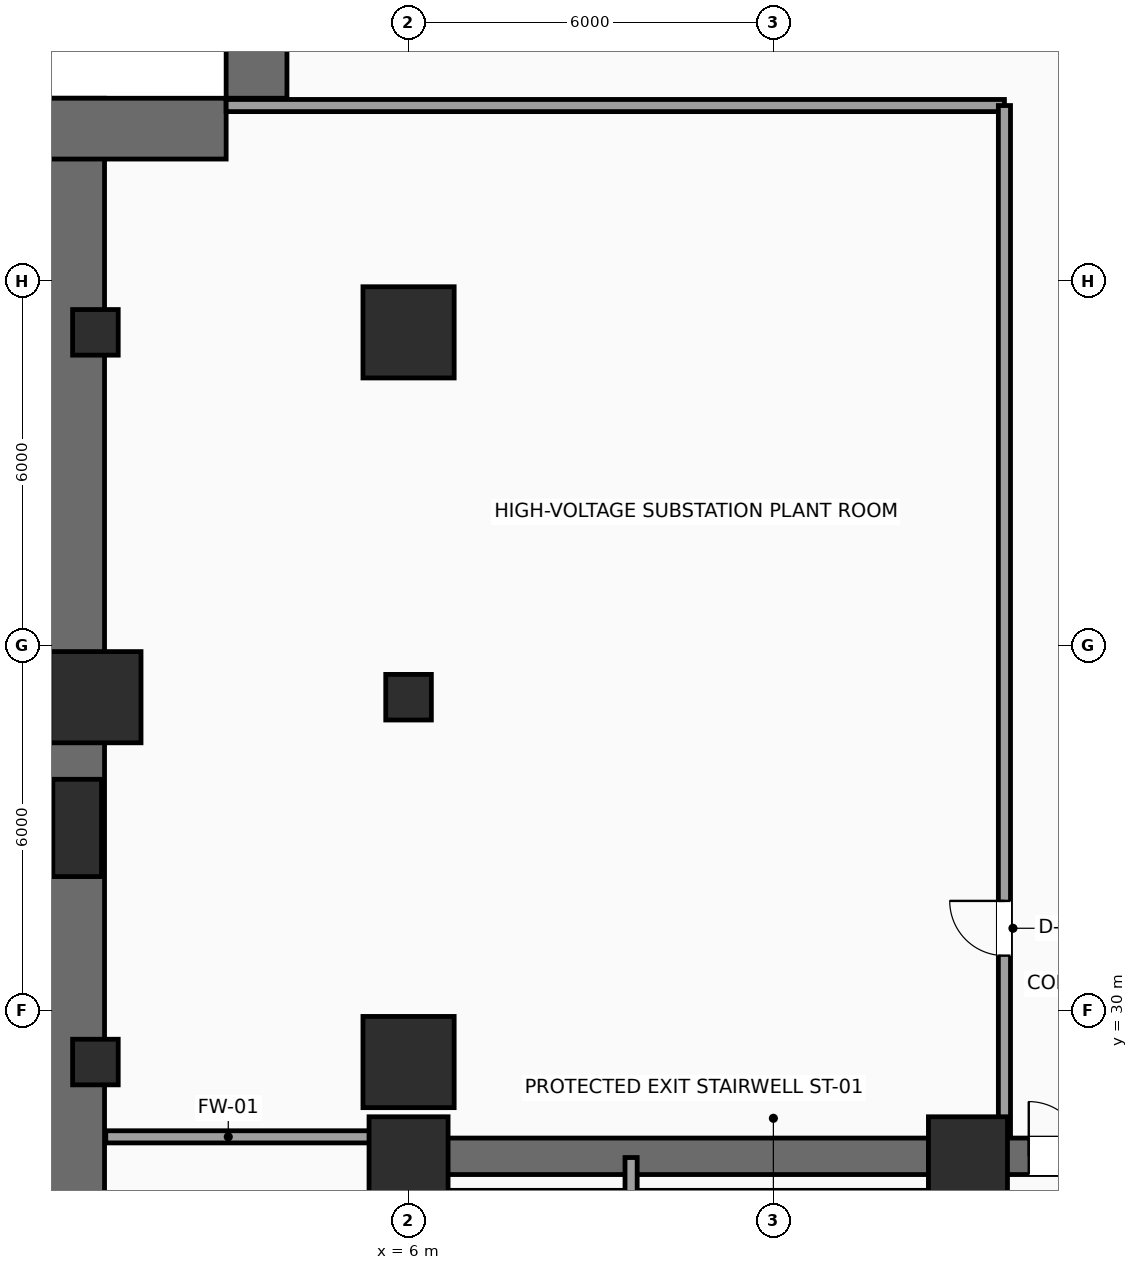
"""IFC4 building model, lengths in metres.
Left out: names, types, materials, properties, quantities, classifications, styles, units other than length and angle.
Written with IfcOpenShell. Run it as: python <this file> out.ifc"""

import sys

from ifc_helpers import new_model, si_unit, direction, frame, frame_2d, origin, origin_2d, place, context, subcontext, project, spatial, rectangle, hollow_rectangle, extrude, element, fill, save


model = new_model("IFC4")
c1 = context("Model", 3, precision=1e-05, world=origin(), true_north=direction((0.0, 1.0)))
c2 = subcontext(c1, "Body", "Model", "MODEL_VIEW")
j1 = project(units=[si_unit("LENGTHUNIT", "METRE"), si_unit("PLANEANGLEUNIT", "RADIAN")], contexts=[c1])
p1 = place(None, origin())
s1 = spatial("IfcSite", under=j1, at=p1, CompositionType="ELEMENT")
p2 = place(p1, origin())
s2 = spatial("IfcBuilding", under=s1, at=p2, CompositionType="ELEMENT")
p3 = place(p2, frame((0.0, 0.0, -9.6)))
s3 = spatial("IfcBuildingStorey", under=s2, at=p3, CompositionType="ELEMENT", Elevation=-9.6)
for number, where, z_axis, x_axis in (
    (1, (6.0, 27.6, 0.0), (0.0, 0.0, 1.0), (1.0, 0.0, 0.0)),
    (2, (15.2, 27.6, 0.0), (0.0, 0.0, 1.0), (1.0, 0.0, 0.0)),
):
    element("IfcColumn", number, at=place(p3, frame(where, z_axis=z_axis, x_axis=x_axis)), inside=s3, PredefinedType="COLUMN", context=c2, shape_type="SweptSolid", body=[
        extrude(rectangle(XDim=1.3, YDim=1.3, at=origin_2d()), origin(), (0.0, 0.0, 1.0), 4.8),
    ])
p4 = place(p3, frame((0.85, 29.15, 0.0), z_axis=(0.0, 0.0, 1.0), x_axis=(1.0, 0.0, 0.0)))
e3 = element("IfcColumn", 3, at=p4, inside=s3, PredefinedType="COLUMN", context=c2, shape_type="SweptSolid", body=[
    extrude(hollow_rectangle(XDim=0.75, YDim=0.75, WallThickness=0.035, InnerFilletRadius=0.035, OuterFilletRadius=0.05, at=origin_2d()), origin(), (0.0, 0.0, 1.0), 4.8),
])
p5 = place(p3, frame((0.85, 35.15, 0.0), z_axis=(0.0, 0.0, 1.0), x_axis=(1.0, 0.0, 0.0)))
e4 = element("IfcColumn", 4, at=p5, inside=s3, PredefinedType="COLUMN", context=c2, shape_type="SweptSolid", body=[
    extrude(rectangle(XDim=1.5, YDim=1.5, at=origin_2d()), origin(), (0.0, 0.0, 1.0), 4.8),
])
p6 = place(p3, frame((0.85, 41.15, 0.0), z_axis=(0.0, 0.0, 1.0), x_axis=(1.0, 0.0, 0.0)))
e5 = element("IfcColumn", 5, at=p6, inside=s3, PredefinedType="COLUMN", context=c2, shape_type="SweptSolid", body=[
    extrude(hollow_rectangle(XDim=0.75, YDim=0.75, WallThickness=0.035, InnerFilletRadius=0.035, OuterFilletRadius=0.05, at=origin_2d()), origin(), (0.0, 0.0, 1.0), 4.8),
])
p7 = place(p3, frame((6.0, 29.15, 0.0), z_axis=(0.0, 0.0, 1.0), x_axis=(1.0, 0.0, 0.0)))
e6 = element("IfcColumn", 6, at=p7, inside=s3, PredefinedType="COLUMN", context=c2, shape_type="SweptSolid", body=[
    extrude(rectangle(XDim=1.5, YDim=1.5, at=origin_2d()), origin(), (0.0, 0.0, 1.0), 4.8),
])
p8 = place(p3, frame((6.0, 35.15, 0.0), z_axis=(0.0, 0.0, 1.0), x_axis=(1.0, 0.0, 0.0)))
e7 = element("IfcColumn", 7, at=p8, inside=s3, PredefinedType="COLUMN", context=c2, shape_type="SweptSolid", body=[
    extrude(hollow_rectangle(XDim=0.75, YDim=0.75, WallThickness=0.035, InnerFilletRadius=0.035, OuterFilletRadius=0.05, at=origin_2d()), origin(), (0.0, 0.0, 1.0), 4.8),
])
p9 = place(p3, frame((6.0, 41.15, 0.0), z_axis=(0.0, 0.0, 1.0), x_axis=(1.0, 0.0, 0.0)))
e8 = element("IfcColumn", 8, at=p9, inside=s3, PredefinedType="COLUMN", context=c2, shape_type="SweptSolid", body=[
    extrude(rectangle(XDim=1.5, YDim=1.5, at=origin_2d()), origin(), (0.0, 0.0, 1.0), 4.8),
])
p10 = place(p3, frame((0.55, 33.0, 0.0), z_axis=(0.0, 0.0, 1.0), x_axis=(1.0, 0.0, 0.0)))
e9 = element("IfcColumn", 9, at=p10, inside=s3, PredefinedType="COLUMN", context=c2, shape_type="SweptSolid", body=[
    extrude(rectangle(XDim=0.8, YDim=1.6, at=origin_2d()), origin(), (0.0, 0.0, 1.0), 4.8),
])
p11 = place(p3, frame((0.5, 3.0, 0.0), z_axis=(0.0, 0.0, 1.0), x_axis=(0.0, 1.0, 0.0)))
e10 = element("IfcWall", 10, at=p11, inside=s3, PredefinedType="USERDEFINED", context=c2, shape_type="SweptSolid", body=[
    extrude(rectangle(XDim=42.0, YDim=1.0, at=frame_2d((21.0, 0.0))), origin(), (0.0, 0.0, 1.0), 4.475),
])
for number, where, z_axis, x_axis in (
    (11, (0.0, 44.5, 0.0), (0.0, 0.0, 1.0), (1.0, 0.0, 0.0)),
    (12, (3.5, 45.0, 0.0), (0.0, 0.0, 1.0), (0.0, 1.0, 0.0)),
):
    element("IfcWall", number, at=place(p3, frame(where, z_axis=z_axis, x_axis=x_axis)), inside=s3, PredefinedType="USERDEFINED", context=c2, shape_type="SweptSolid", body=[
        extrude(rectangle(XDim=3.0, YDim=1.0, at=frame_2d((1.5, 0.0))), origin(), (0.0, 0.0, 1.0), 4.475),
    ])
p12 = place(p3, frame((6.0, 27.6, 0.0), z_axis=(0.0, 0.0, 1.0), x_axis=(1.0, 0.0, 0.0)))
e13 = element("IfcWall", 13, at=p12, inside=s3, PredefinedType="SHEAR", context=c2, shape_type="SweptSolid", body=[
    extrude(rectangle(XDim=12.0, YDim=0.6, at=frame_2d((6.0, 0.0))), origin(), (0.0, 0.0, 1.0), 4.475),
])
p13 = place(p12, frame((10.2, 0.0, 0.0)))
e14 = element("IfcOpeningElement", 14, at=p13, cuts=e13, PredefinedType="OPENING", context=c2, shape_type="SweptSolid", body=[
    extrude(rectangle(XDim=0.9, YDim=2.15, at=frame_2d((0.45, 1.075))), frame((0.0, 0.31, 0.0), z_axis=(0.0, -1.0, 0.0), x_axis=(1.0, 0.0, 0.0)), (0.0, 0.0, 1.0), 0.62),
])
p14 = place(p3, frame((6.0, 18.0, 0.0), z_axis=(0.0, 0.0, 1.0), x_axis=(0.0, 1.0, 0.0)))
e15 = element("IfcWall", 15, at=p14, inside=s3, PredefinedType="SHEAR", context=c2, shape_type="SweptSolid", body=[
    extrude(rectangle(XDim=9.6, YDim=0.6, at=frame_2d((4.8, 0.0))), origin(), (0.0, 0.0, 1.0), 4.475),
])
p15 = place(p3, frame((15.18, 23.26, 0.0), z_axis=(0.0, 0.0, 1.0), x_axis=(0.0, 1.0, 0.0)))
e16 = element("IfcWall", 16, at=p15, inside=s3, PredefinedType="SHEAR", context=c2, shape_type="SweptSolid", body=[
    extrude(rectangle(XDim=4.04, YDim=0.2, at=frame_2d((2.02, 0.0))), origin(), (0.0, 0.0, 1.0), 4.475),
])
p16 = place(p3, frame((9.66, 26.94, 0.0), z_axis=(0.0, 0.0, 1.0), x_axis=(0.0, 1.0, 0.0)))
e17 = element("IfcWall", 17, at=p16, inside=s3, PredefinedType="SOLIDWALL", context=c2, shape_type="SweptSolid", body=[
    extrude(rectangle(XDim=0.64, YDim=0.2, at=frame_2d((0.32, 0.0))), origin(), (0.0, 0.0, 1.0), 4.475),
])
p17 = place(p3, frame((1.02, 27.92, 0.0), z_axis=(0.0, 0.0, 1.0), x_axis=(1.0, 0.0, 0.0)))
e18 = element("IfcWall", 18, at=p17, inside=s3, PredefinedType="SOLIDWALL", context=c2, shape_type="SweptSolid", body=[
    extrude(rectangle(XDim=4.98, YDim=0.2, at=frame_2d((2.49, 0.0))), origin(), (0.0, 0.0, 1.0), 4.475),
])
p18 = place(p3, frame((3.0, 44.88, 0.0), z_axis=(0.0, 0.0, 1.0), x_axis=(1.0, 0.0, 0.0)))
e19 = element("IfcWall", 19, at=p18, inside=s3, PredefinedType="SOLIDWALL", context=c2, shape_type="SweptSolid", body=[
    extrude(rectangle(XDim=12.8, YDim=0.2, at=frame_2d((6.4, 0.0))), origin(), (0.0, 0.0, 1.0), 4.475),
])
p19 = place(p3, frame((15.8, 27.92, 0.0), z_axis=(0.0, 0.0, 1.0), x_axis=(0.0, 1.0, 0.0)))
e20 = element("IfcWall", 20, at=p19, inside=s3, PredefinedType="SOLIDWALL", context=c2, shape_type="SweptSolid", body=[
    extrude(rectangle(XDim=16.96, YDim=0.2, at=frame_2d((8.48, 0.0))), origin(), (0.0, 0.0, 1.0), 4.475),
])
p20 = place(p19, frame((2.98, 0.0, 0.0)))
e21 = element("IfcOpeningElement", 21, at=p20, cuts=e20, PredefinedType="OPENING", context=c2, shape_type="SweptSolid", body=[
    extrude(rectangle(XDim=0.9, YDim=2.15, at=frame_2d((0.45, 1.075))), frame((0.0, 0.11, 0.0), z_axis=(0.0, -1.0, 0.0), x_axis=(1.0, 0.0, 0.0)), (0.0, 0.0, 1.0), 0.22),
])
p21 = place(p13, origin())
e22 = element("IfcDoor", 22, at=p21, inside=s3, OperationType="SINGLE_SWING_LEFT", PredefinedType="DOOR", context=c2, shape_type="SweptSolid", body=[
    extrude(rectangle(XDim=0.9, YDim=2.15, at=frame_2d((0.45, 1.075))), frame((0.0, 0.025, 0.0), z_axis=(0.0, -1.0, 0.0), x_axis=(1.0, 0.0, 0.0)), (0.0, 0.0, 1.0), 0.05),
])
fill(e14, e22)
p22 = place(p20, origin())
e23 = element("IfcDoor", 23, at=p22, inside=s3, OperationType="SINGLE_SWING_RIGHT", PredefinedType="DOOR", context=c2, shape_type="SweptSolid", body=[
    extrude(rectangle(XDim=0.9, YDim=2.15, at=frame_2d((0.45, 1.075))), frame((0.0, 0.025, 0.0), z_axis=(0.0, -1.0, 0.0), x_axis=(1.0, 0.0, 0.0)), (0.0, 0.0, 1.0), 0.05),
])
fill(e21, e23)
save(model, sys.argv[1])
